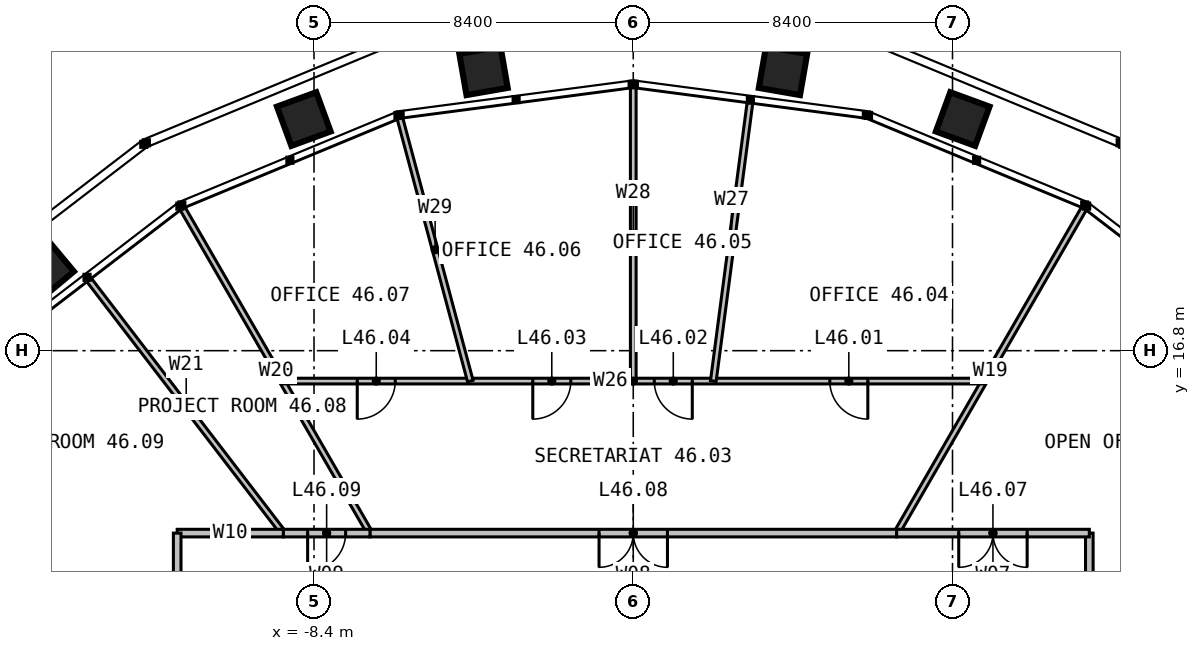
"""IFC4 building model, lengths in metres.
Left out: names, types, materials, properties, quantities, classifications, styles, units other than length and angle.
Written with IfcOpenShell. Run it as: python <this file> out.ifc"""

import sys

from ifc_helpers import new_model, si_unit, direction, frame, frame_2d, origin, place, context, subcontext, project, spatial, rectangle, extrude, element, fill, save


model = new_model("IFC4")
c1 = context("Model", 3, precision=1e-05, world=origin(), true_north=direction((0.0, 1.0)))
c2 = subcontext(c1, "Body", "Model", "MODEL_VIEW")
j1 = project(units=[si_unit("LENGTHUNIT", "METRE"), si_unit("PLANEANGLEUNIT", "RADIAN")], contexts=[c1])
p1 = place(None, origin())
s1 = spatial("IfcSite", under=j1, at=p1, CompositionType="ELEMENT")
p2 = place(p1, origin())
s2 = spatial("IfcBuilding", under=s1, at=p2, CompositionType="ELEMENT")
p3 = place(p2, frame((0.0, 0.0, 191.0)))
s3 = spatial("IfcBuildingStorey", under=s2, at=p3, CompositionType="ELEMENT", Elevation=191.0)
for number, where, z_axis, x_axis in (
    (1, (12.0, 6.928, 0.0), (0.0, 0.0, 1.0), (0.866, 0.5, 0.0)),
    (2, (6.928, 12.0, 0.0), (0.0, 0.0, 1.0), (0.5, 0.866, 0.0)),
    (3, (-6.928, 12.0, 0.0), (0.0, 0.0, 1.0), (-0.5, 0.866, 0.0)),
):
    element("IfcWall", number, at=place(p3, frame(where, z_axis=z_axis, x_axis=x_axis)), inside=s3, PredefinedType="PARTITIONING", context=c2, shape_type="SweptSolid", body=[
        extrude(rectangle(XDim=9.865, YDim=0.15, at=frame_2d((4.932, 0.0))), origin(), (0.0, 0.0, 1.0), 2.79),
    ])
p4 = place(p3, frame((-9.208, 12.0, 0.0), z_axis=(0.0, 0.0, 1.0), x_axis=(-0.608769821811, 0.793346900197, 0.0)))
e4 = element("IfcWall", 4, at=p4, inside=s3, PredefinedType="PARTITIONING", context=c2, shape_type="SweptSolid", body=[
    extrude(rectangle(XDim=8.393, YDim=0.15, at=frame_2d((4.196, 0.0))), origin(), (0.0, 0.0, 1.0), 2.79),
])
p5 = place(p3, frame((-12.0, 6.928, 0.0), z_axis=(0.0, 0.0, 1.0), x_axis=(-0.866027739639, 0.49999595416, 0.0)))
e5 = element("IfcWall", 5, at=p5, inside=s3, PredefinedType="PARTITIONING", context=c2, shape_type="SweptSolid", body=[
    extrude(rectangle(XDim=9.865, YDim=0.15, at=frame_2d((4.932, 0.0))), origin(), (0.0, 0.0, 1.0), 2.79),
])
p6 = place(p3, frame((12.0, 6.928, 0.0), z_axis=(0.0, 0.0, 1.0), x_axis=(0.0, 1.0, 0.0)))
e6 = element("IfcWall", 6, at=p6, inside=s3, PredefinedType="PARTITIONING", context=c2, shape_type="SweptSolid", body=[
    extrude(rectangle(XDim=5.072, YDim=0.2, at=frame_2d((2.536, 0.0))), origin(), (0.0, 0.0, 1.0), 3.8),
])
p7 = place(p3, frame((12.0, 12.0, 0.0), z_axis=(0.0, 0.0, 1.0), x_axis=(-1.0, 0.0, 0.0)))
e7 = element("IfcWall", 7, at=p7, inside=s3, PredefinedType="PARTITIONING", context=c2, shape_type="SweptSolid", body=[
    extrude(rectangle(XDim=5.072, YDim=0.2, at=frame_2d((2.536, 0.0))), origin(), (0.0, 0.0, 1.0), 3.8),
])
p8 = place(p7, frame((1.636, 0.0, 0.0)))
e8 = element("IfcOpeningElement", 8, at=p8, cuts=e7, PredefinedType="OPENING", context=c2, shape_type="SweptSolid", body=[
    extrude(rectangle(XDim=1.8, YDim=2.2, at=frame_2d((0.9, 1.1))), frame((0.0, 0.11, 0.0), z_axis=(0.0, -1.0, 0.0), x_axis=(1.0, 0.0, 0.0)), (0.0, 0.0, 1.0), 0.22),
])
p9 = place(p3, frame((9.238, 16.0, 0.0), z_axis=(0.0, 0.0, 1.0), x_axis=(-1.0, 0.0, 0.0)))
e9 = element("IfcWall", 9, at=p9, inside=s3, PredefinedType="PARTITIONING", context=c2, shape_type="SweptSolid", body=[
    extrude(rectangle(XDim=18.475, YDim=0.15, at=frame_2d((9.238, 0.0))), origin(), (0.0, 0.0, 1.0), 2.79),
])
p10 = place(p9, frame((3.066, 0.0, 0.0)))
e10 = element("IfcOpeningElement", 10, at=p10, cuts=e9, PredefinedType="OPENING", context=c2, shape_type="SweptSolid", body=[
    extrude(rectangle(XDim=1.0, YDim=2.2, at=frame_2d((0.5, 1.1))), frame((0.0, 0.085, 0.0), z_axis=(0.0, -1.0, 0.0), x_axis=(1.0, 0.0, 0.0)), (0.0, 0.0, 1.0), 0.17),
])
p11 = place(p9, frame((7.684, 0.0, 0.0)))
e11 = element("IfcOpeningElement", 11, at=p11, cuts=e9, PredefinedType="OPENING", context=c2, shape_type="SweptSolid", body=[
    extrude(rectangle(XDim=1.0, YDim=2.2, at=frame_2d((0.5, 1.1))), frame((0.0, 0.085, 0.0), z_axis=(0.0, -1.0, 0.0), x_axis=(1.0, 0.0, 0.0)), (0.0, 0.0, 1.0), 0.17),
])
p12 = place(p9, frame((10.881, 0.0, 0.0)))
e12 = element("IfcOpeningElement", 12, at=p12, cuts=e9, PredefinedType="OPENING", context=c2, shape_type="SweptSolid", body=[
    extrude(rectangle(XDim=1.0, YDim=2.2, at=frame_2d((0.5, 1.1))), frame((0.0, 0.085, 0.0), z_axis=(0.0, -1.0, 0.0), x_axis=(1.0, 0.0, 0.0)), (0.0, 0.0, 1.0), 0.17),
])
p13 = place(p9, frame((15.5, 0.0, 0.0)))
e13 = element("IfcOpeningElement", 13, at=p13, cuts=e9, PredefinedType="OPENING", context=c2, shape_type="SweptSolid", body=[
    extrude(rectangle(XDim=1.0, YDim=2.2, at=frame_2d((0.5, 1.1))), frame((0.0, 0.085, 0.0), z_axis=(0.0, -1.0, 0.0), x_axis=(1.0, 0.0, 0.0)), (0.0, 0.0, 1.0), 0.17),
])
p14 = place(p3, frame((2.106, 16.0, 0.0), z_axis=(0.0, 0.0, 1.0), x_axis=(0.130534093561, 0.991443821111, 0.0)))
e14 = element("IfcWall", 14, at=p14, inside=s3, PredefinedType="PARTITIONING", context=c2, shape_type="SweptSolid", body=[
    extrude(rectangle(XDim=7.38, YDim=0.15, at=frame_2d((3.69, 0.0))), origin(), (0.0, 0.0, 1.0), 2.79),
])
p15 = place(p3, frame((0.0, 16.0, 0.0), z_axis=(0.0, 0.0, 1.0), x_axis=(0.0, 1.0, 0.0)))
e15 = element("IfcWall", 15, at=p15, inside=s3, PredefinedType="PARTITIONING", context=c2, shape_type="SweptSolid", body=[
    extrude(rectangle(XDim=7.721, YDim=0.15, at=frame_2d((3.861, 0.0))), origin(), (0.0, 0.0, 1.0), 2.79),
])
p16 = place(p3, frame((-4.287, 16.0, 0.0), z_axis=(0.0, 0.0, 1.0), x_axis=(-0.25881963763, 0.965925667522, 0.0)))
e16 = element("IfcWall", 16, at=p16, inside=s3, PredefinedType="PARTITIONING", context=c2, shape_type="SweptSolid", body=[
    extrude(rectangle(XDim=7.157, YDim=0.15, at=frame_2d((3.578, 0.0))), origin(), (0.0, 0.0, 1.0), 2.79),
])
p17 = place(p3, frame((6.928, 12.0, 0.0), z_axis=(0.0, 0.0, 1.0), x_axis=(-1.0, 0.0, 0.0)))
e17 = element("IfcWall", 17, at=p17, inside=s3, PredefinedType="PARTITIONING", context=c2, shape_type="SweptSolid", body=[
    extrude(rectangle(XDim=13.856, YDim=0.2, at=frame_2d((6.928, 0.0))), origin(), (0.0, 0.0, 1.0), 3.8),
])
p18 = place(p17, frame((6.028, 0.0, 0.0)))
e18 = element("IfcOpeningElement", 18, at=p18, cuts=e17, PredefinedType="OPENING", context=c2, shape_type="SweptSolid", body=[
    extrude(rectangle(XDim=1.8, YDim=2.2, at=frame_2d((0.9, 1.1))), frame((0.0, 0.11, 0.0), z_axis=(0.0, -1.0, 0.0), x_axis=(1.0, 0.0, 0.0)), (0.0, 0.0, 1.0), 0.22),
])
p19 = place(p3, frame((-6.928, 12.0, 0.0), z_axis=(0.0, 0.0, 1.0), x_axis=(-1.0, 0.0, 0.0)))
e19 = element("IfcWall", 19, at=p19, inside=s3, PredefinedType="PARTITIONING", context=c2, shape_type="SweptSolid", body=[
    extrude(rectangle(XDim=2.28, YDim=0.2, at=frame_2d((1.14, 0.0))), origin(), (0.0, 0.0, 1.0), 3.8),
])
p20 = place(p19, frame((0.64, 0.0, 0.0)))
e20 = element("IfcOpeningElement", 20, at=p20, cuts=e19, PredefinedType="OPENING", context=c2, shape_type="SweptSolid", body=[
    extrude(rectangle(XDim=1.0, YDim=2.2, at=frame_2d((0.5, 1.1))), frame((0.0, 0.11, 0.0), z_axis=(0.0, -1.0, 0.0), x_axis=(1.0, 0.0, 0.0)), (0.0, 0.0, 1.0), 0.22),
])
p21 = place(p3, frame((-9.208, 12.0, 0.0), z_axis=(0.0, 0.0, 1.0), x_axis=(-1.0, 0.0, 0.0)))
e21 = element("IfcWall", 21, at=p21, inside=s3, PredefinedType="PARTITIONING", context=c2, shape_type="SweptSolid", body=[
    extrude(rectangle(XDim=2.792, YDim=0.2, at=frame_2d((1.396, 0.0))), origin(), (0.0, 0.0, 1.0), 3.8),
])
p22 = place(p3, frame((-12.0, 12.0, 0.0), z_axis=(0.0, 0.0, 1.0), x_axis=(0.0, -1.0, 0.0)))
e22 = element("IfcWall", 22, at=p22, inside=s3, PredefinedType="PARTITIONING", context=c2, shape_type="SweptSolid", body=[
    extrude(rectangle(XDim=5.072, YDim=0.2, at=frame_2d((2.536, 0.0))), origin(), (0.0, 0.0, 1.0), 3.8),
])
p23 = place(p22, frame((2.036, 0.0, 0.0)))
e23 = element("IfcOpeningElement", 23, at=p23, cuts=e22, PredefinedType="OPENING", context=c2, shape_type="SweptSolid", body=[
    extrude(rectangle(XDim=1.0, YDim=2.2, at=frame_2d((0.5, 1.1))), frame((0.0, 0.11, 0.0), z_axis=(0.0, -1.0, 0.0), x_axis=(1.0, 0.0, 0.0)), (0.0, 0.0, 1.0), 0.22),
])
p24 = place(p8, origin())
e24 = element("IfcDoor", 24, at=p24, inside=s3, OperationType="DOUBLE_DOOR_SINGLE_SWING", PredefinedType="DOOR", context=c2, shape_type="SweptSolid", body=[
    extrude(rectangle(XDim=1.8, YDim=2.2, at=frame_2d((0.9, 1.1))), frame((0.0, 0.025, 0.0), z_axis=(0.0, -1.0, 0.0), x_axis=(1.0, 0.0, 0.0)), (0.0, 0.0, 1.0), 0.05),
])
fill(e8, e24)
p25 = place(p10, origin())
e25 = element("IfcDoor", 25, at=p25, inside=s3, OperationType="SINGLE_SWING_LEFT", PredefinedType="DOOR", context=c2, shape_type="SweptSolid", body=[
    extrude(rectangle(XDim=1.0, YDim=2.2, at=frame_2d((0.5, 1.1))), frame((0.0, 0.025, 0.0), z_axis=(0.0, -1.0, 0.0), x_axis=(1.0, 0.0, 0.0)), (0.0, 0.0, 1.0), 0.05),
])
fill(e10, e25)
p26 = place(p11, origin())
e26 = element("IfcDoor", 26, at=p26, inside=s3, OperationType="SINGLE_SWING_LEFT", PredefinedType="DOOR", context=c2, shape_type="SweptSolid", body=[
    extrude(rectangle(XDim=1.0, YDim=2.2, at=frame_2d((0.5, 1.1))), frame((0.0, 0.025, 0.0), z_axis=(0.0, -1.0, 0.0), x_axis=(1.0, 0.0, 0.0)), (0.0, 0.0, 1.0), 0.05),
])
fill(e11, e26)
p27 = place(p12, origin())
e27 = element("IfcDoor", 27, at=p27, inside=s3, OperationType="SINGLE_SWING_RIGHT", PredefinedType="DOOR", context=c2, shape_type="SweptSolid", body=[
    extrude(rectangle(XDim=1.0, YDim=2.2, at=frame_2d((0.5, 1.1))), frame((0.0, 0.025, 0.0), z_axis=(0.0, -1.0, 0.0), x_axis=(1.0, 0.0, 0.0)), (0.0, 0.0, 1.0), 0.05),
])
fill(e12, e27)
p28 = place(p13, origin())
e28 = element("IfcDoor", 28, at=p28, inside=s3, OperationType="SINGLE_SWING_RIGHT", PredefinedType="DOOR", context=c2, shape_type="SweptSolid", body=[
    extrude(rectangle(XDim=1.0, YDim=2.2, at=frame_2d((0.5, 1.1))), frame((0.0, 0.025, 0.0), z_axis=(0.0, -1.0, 0.0), x_axis=(1.0, 0.0, 0.0)), (0.0, 0.0, 1.0), 0.05),
])
fill(e13, e28)
p29 = place(p18, origin())
e29 = element("IfcDoor", 29, at=p29, inside=s3, OperationType="DOUBLE_DOOR_SINGLE_SWING", PredefinedType="DOOR", context=c2, shape_type="SweptSolid", body=[
    extrude(rectangle(XDim=1.8, YDim=2.2, at=frame_2d((0.9, 1.1))), frame((0.0, 0.025, 0.0), z_axis=(0.0, -1.0, 0.0), x_axis=(1.0, 0.0, 0.0)), (0.0, 0.0, 1.0), 0.05),
])
fill(e18, e29)
p30 = place(p20, origin())
e30 = element("IfcDoor", 30, at=p30, inside=s3, OperationType="SINGLE_SWING_RIGHT", PredefinedType="DOOR", context=c2, shape_type="SweptSolid", body=[
    extrude(rectangle(XDim=1.0, YDim=2.2, at=frame_2d((0.5, 1.1))), frame((0.0, 0.025, 0.0), z_axis=(0.0, -1.0, 0.0), x_axis=(1.0, 0.0, 0.0)), (0.0, 0.0, 1.0), 0.05),
])
fill(e20, e30)
save(model, sys.argv[1])
